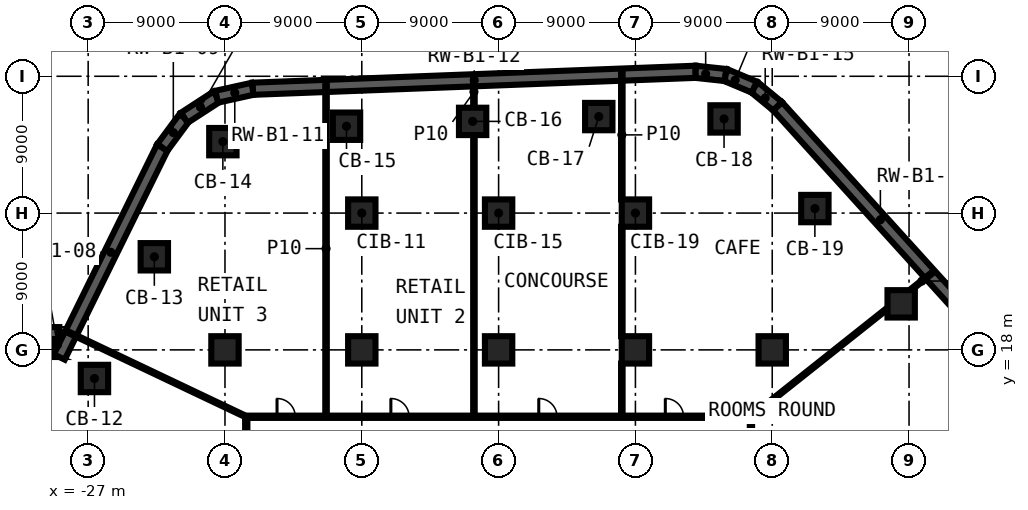
"""IFC4 building model, lengths in metres.
Left out: names, types, materials, properties, quantities, classifications, styles, units other than length and angle.
Written with IfcOpenShell. Run it as: python <this file> out.ifc"""

import sys

from ifc_helpers import new_model, si_unit, direction, frame, frame_2d, origin, origin_2d, place, context, subcontext, project, spatial, polyline, rectangle, outline, extrude, element, fill, save


model = new_model("IFC4")
c1 = context("Model", 3, precision=1e-05, world=origin(), true_north=direction((0.0, 1.0)))
c2 = subcontext(c1, "Body", "Model", "MODEL_VIEW")
j1 = project(units=[si_unit("LENGTHUNIT", "METRE"), si_unit("PLANEANGLEUNIT", "RADIAN")], contexts=[c1])
p1 = place(None, origin())
s1 = spatial("IfcSite", under=j1, at=p1, CompositionType="ELEMENT")
p2 = place(p1, origin())
s2 = spatial("IfcBuilding", under=s1, at=p2, CompositionType="ELEMENT")
p3 = place(p2, frame((0.0, 0.0, -6.0)))
s3 = spatial("IfcBuildingStorey", under=s2, at=p3, CompositionType="ELEMENT", Elevation=-6.0)
for number, where, z_axis, x_axis in (
    (1, (-26.586, 16.118, 0.0), (0.0, 0.0, 1.0), (1.0, 0.0, 0.0)),
    (2, (-22.648, 24.125, 0.0), (0.0, 0.0, 1.0), (1.0, 0.0, 0.0)),
    (3, (-18.139, 31.699, 0.0), (0.0, 0.0, 1.0), (1.0, 0.0, 0.0)),
    (4, (-10.006, 32.714, 0.0), (0.0, 0.0, 1.0), (1.0, 0.0, 0.0)),
    (5, (-1.708, 33.032, 0.0), (0.0, 0.0, 1.0), (1.0, 0.0, 0.0)),
    (6, (6.589, 33.349, 0.0), (0.0, 0.0, 1.0), (1.0, 0.0, 0.0)),
    (7, (14.83, 33.194, 0.0), (0.0, 0.0, 1.0), (1.0, 0.0, 0.0)),
    (8, (20.805, 27.297, 0.0), (0.0, 0.0, 1.0), (1.0, 0.0, 0.0)),
    (9, (26.482, 21.029, 0.0), (0.0, 0.0, 1.0), (1.0, 0.0, 0.0)),
    (10, (-18.0, 18.0, 0.0), (0.0, 0.0, 1.0), (1.0, 0.0, 0.0)),
    (11, (-9.0, 18.0, 0.0), (0.0, 0.0, 1.0), (1.0, 0.0, 0.0)),
    (12, (-9.0, 27.0, 0.0), (0.0, 0.0, 1.0), (1.0, 0.0, 0.0)),
    (13, (0.0, 18.0, 0.0), (0.0, 0.0, 1.0), (1.0, 0.0, 0.0)),
    (14, (0.0, 27.0, 0.0), (0.0, 0.0, 1.0), (1.0, 0.0, 0.0)),
    (15, (9.0, 18.0, 0.0), (0.0, 0.0, 1.0), (1.0, 0.0, 0.0)),
    (16, (9.0, 27.0, 0.0), (0.0, 0.0, 1.0), (1.0, 0.0, 0.0)),
    (17, (18.0, 18.0, 0.0), (0.0, 0.0, 1.0), (1.0, 0.0, 0.0)),
):
    element("IfcColumn", number, at=place(p3, frame(where, z_axis=z_axis, x_axis=x_axis)), inside=s3, PredefinedType="COLUMN", context=c2, shape_type="SweptSolid", body=[
        extrude(rectangle(XDim=1.8, YDim=1.8, at=origin_2d()), origin(), (0.0, 0.0, 1.0), 5.55),
    ])
p4 = place(p3, frame((-59.1, 19.1, 0.0), z_axis=(0.0, 0.0, 1.0), x_axis=(1.0, 0.0, 0.0)))
e18 = element("IfcWall", 18, at=p4, inside=s3, PredefinedType="SHEAR", context=c2, shape_type="SweptSolid", body=[
    extrude(rectangle(XDim=30.2, YDim=0.8, at=frame_2d((15.1, 0.0))), origin(), (0.0, 0.0, 1.0), 5.55),
])
p5 = place(p4, frame((14.3, 0.0, 0.0)))
e19 = element("IfcOpeningElement", 19, at=p5, cuts=e18, PredefinedType="OPENING", context=c2, shape_type="SweptSolid", body=[
    extrude(rectangle(XDim=1.6, YDim=2.4, at=frame_2d((0.8, 1.2))), frame((0.0, 0.41, 0.0), z_axis=(0.0, -1.0, 0.0), x_axis=(1.0, 0.0, 0.0)), (0.0, 0.0, 1.0), 0.82),
])
p6 = place(p3, origin())
e20 = element("IfcWall", 20, at=p6, inside=s3, PredefinedType="SHEAR", context=c2, shape_type="SweptSolid", body=[
    extrude(outline(polyline([(-29.3, 17.532), (-28.9, 17.532), (-29.259, 17.708), (-28.574, 19.1), (-28.9, 19.1), (-28.9, 18.7), (-29.3, 18.7), (-29.3, 17.532)])), origin(), (0.0, 0.0, 1.0), 5.55),
])
p7 = place(p3, frame((-28.9, 17.532, 0.0), z_axis=(0.0, 0.0, 1.0), x_axis=(0.44134064225, 0.897339644448, 0.0)))
e21 = element("IfcWall", 21, at=p7, inside=s3, PredefinedType="SHEAR", context=c2, shape_type="SweptSolid", body=[
    extrude(rectangle(XDim=15.356, YDim=0.8, at=frame_2d((7.678, 0.0))), origin(), (0.0, 0.0, 1.0), 5.55),
])
p8 = place(p3, frame((-22.123, 31.312, 0.0), z_axis=(0.0, 0.0, 1.0), x_axis=(0.594199556296, 0.80431765323, 0.0)))
e22 = element("IfcWall", 22, at=p8, inside=s3, PredefinedType="SHEAR", context=c2, shape_type="SweptSolid", body=[
    extrude(rectangle(XDim=2.438, YDim=0.8, at=frame_2d((1.219, 0.0))), origin(), (0.0, 0.0, 1.0), 5.55),
])
p9 = place(p3, frame((-20.674, 33.272, 0.0), z_axis=(0.0, 0.0, 1.0), x_axis=(0.838722623466, 0.544558868155, 0.0)))
e23 = element("IfcWall", 23, at=p9, inside=s3, PredefinedType="SHEAR", context=c2, shape_type="SweptSolid", body=[
    extrude(rectangle(XDim=2.538, YDim=0.8, at=frame_2d((1.269, 0.0))), origin(), (0.0, 0.0, 1.0), 5.55),
])
p10 = place(p3, frame((-18.545, 34.654, 0.0), z_axis=(0.0, 0.0, 1.0), x_axis=(0.976429182158, 0.215838023136, 0.0)))
e24 = element("IfcWall", 24, at=p10, inside=s3, PredefinedType="SHEAR", context=c2, shape_type="SweptSolid", body=[
    extrude(rectangle(XDim=2.438, YDim=0.8, at=frame_2d((1.219, 0.0))), origin(), (0.0, 0.0, 1.0), 5.55),
])
p11 = place(p3, frame((-16.165, 35.18, 0.0), z_axis=(0.0, 0.0, 1.0), x_axis=(0.999268826627, 0.038233651829, 0.0)))
e25 = element("IfcWall", 25, at=p11, inside=s3, PredefinedType="SHEAR", context=c2, shape_type="SweptSolid", body=[
    extrude(rectangle(XDim=29.143, YDim=0.8, at=frame_2d((14.572, 0.0))), origin(), (0.0, 0.0, 1.0), 5.55),
])
p12 = place(p3, origin())
e26 = element("IfcWall", 26, at=p12, inside=s3, PredefinedType="SHEAR", context=c2, shape_type="SweptSolid", body=[
    extrude(outline(polyline([(14.97, 36.48), (13.0, 36.692), (12.957, 36.295), (12.972, 35.895), (12.943, 35.894), (14.884, 35.685), (14.97, 36.48)])), origin(), (0.0, 0.0, 1.0), 5.55),
])
p13 = place(p3, origin())
e27 = element("IfcWall", 27, at=p13, inside=s3, PredefinedType="SHEAR", context=c2, shape_type="SweptSolid", body=[
    extrude(outline(polyline([(16.983, 35.651), (15.082, 36.451), (14.927, 36.083), (14.884, 35.685), (14.826, 35.691), (16.673, 34.914), (16.983, 35.651)])), origin(), (0.0, 0.0, 1.0), 5.55),
])
p14 = place(p3, origin())
e28 = element("IfcWall", 28, at=p14, inside=s3, PredefinedType="SHEAR", context=c2, shape_type="SweptSolid", body=[
    extrude(outline(polyline([(18.612, 34.331), (17.083, 35.591), (16.828, 35.282), (16.673, 34.914), (16.619, 34.937), (18.08, 33.732), (18.061, 33.754), (18.357, 34.022), (18.612, 34.331)])), origin(), (0.0, 0.0, 1.0), 5.55),
])
p15 = place(p3, frame((18.357, 34.022, 0.0), z_axis=(0.0, 0.0, 1.0), x_axis=(0.671253662178, -0.741227711983, 0.0)))
e29 = element("IfcWall", 29, at=p15, inside=s3, PredefinedType="SHEAR", context=c2, shape_type="SweptSolid", body=[
    extrude(rectangle(XDim=20.132, YDim=0.8, at=frame_2d((10.066, 0.0))), origin(), (0.0, 0.0, 1.0), 5.55),
])
p16 = place(p3, frame((-16.675, 13.6, 0.0), z_axis=(0.0, 0.0, 1.0), x_axis=(1.0, 0.0, 0.0)))
e30 = element("IfcWall", 30, at=p16, inside=s3, PredefinedType="PARTITIONING", context=c2, shape_type="SweptSolid", body=[
    extrude(rectangle(XDim=33.35, YDim=0.15, at=frame_2d((16.675, 0.0))), origin(), (0.0, 0.0, 1.0), 5.55),
])
p17 = place(p16, frame((27.642, 0.0, 0.0)))
e31 = element("IfcOpeningElement", 31, at=p17, cuts=e30, PredefinedType="OPENING", context=c2, shape_type="SweptSolid", body=[
    extrude(rectangle(XDim=1.2, YDim=2.1, at=frame_2d((0.6, 1.05))), frame((0.0, 0.085, 0.0), z_axis=(0.0, -1.0, 0.0), x_axis=(1.0, 0.0, 0.0)), (0.0, 0.0, 1.0), 0.17),
])
p18 = place(p16, frame((19.317, 0.0, 0.0)))
e32 = element("IfcOpeningElement", 32, at=p18, cuts=e30, PredefinedType="OPENING", context=c2, shape_type="SweptSolid", body=[
    extrude(rectangle(XDim=1.2, YDim=2.1, at=frame_2d((0.6, 1.05))), frame((0.0, 0.085, 0.0), z_axis=(0.0, -1.0, 0.0), x_axis=(1.0, 0.0, 0.0)), (0.0, 0.0, 1.0), 0.17),
])
p19 = place(p16, frame((9.587, 0.0, 0.0)))
e33 = element("IfcOpeningElement", 33, at=p19, cuts=e30, PredefinedType="OPENING", context=c2, shape_type="SweptSolid", body=[
    extrude(rectangle(XDim=1.2, YDim=2.1, at=frame_2d((0.6, 1.05))), frame((0.0, 0.085, 0.0), z_axis=(0.0, -1.0, 0.0), x_axis=(1.0, 0.0, 0.0)), (0.0, 0.0, 1.0), 0.17),
])
p20 = place(p16, frame((2.099, 0.0, 0.0)))
e34 = element("IfcOpeningElement", 34, at=p20, cuts=e30, PredefinedType="OPENING", context=c2, shape_type="SweptSolid", body=[
    extrude(rectangle(XDim=1.2, YDim=2.1, at=frame_2d((0.6, 1.05))), frame((0.0, 0.085, 0.0), z_axis=(0.0, -1.0, 0.0), x_axis=(1.0, 0.0, 0.0)), (0.0, 0.0, 1.0), 0.17),
])
p21 = place(p3, frame((16.6, 13.6, 0.0), z_axis=(0.0, 0.0, 1.0), x_axis=(0.783150180029, 0.621832610531, 0.0)))
e35 = element("IfcWall", 35, at=p21, inside=s3, PredefinedType="PARTITIONING", context=c2, shape_type="SweptSolid", body=[
    extrude(rectangle(XDim=11.469, YDim=0.1, at=frame_2d((5.734, 0.0))), origin(), (0.0, 0.0, 1.0), 5.55),
])
p22 = place(p3, frame((27.091, 21.929, 0.0), z_axis=(0.0, 0.0, 1.0), x_axis=(0.783148932994, 0.621834181073, 0.0)))
e36 = element("IfcWall", 36, at=p22, inside=s3, PredefinedType="PARTITIONING", context=c2, shape_type="SweptSolid", body=[
    extrude(rectangle(XDim=1.928, YDim=0.1, at=frame_2d((0.964, 0.0))), origin(), (0.0, 0.0, 1.0), 5.55),
])
p23 = place(p3, frame((16.6, 13.525, 0.0), z_axis=(0.0, 0.0, 1.0), x_axis=(0.0, -1.0, 0.0)))
e37 = element("IfcWall", 37, at=p23, inside=s3, PredefinedType="PARTITIONING", context=c2, shape_type="SweptSolid", body=[
    extrude(rectangle(XDim=27.05, YDim=0.15, at=frame_2d((13.525, 0.0))), origin(), (0.0, 0.0, 1.0), 5.55),
])
p24 = place(p23, frame((18.025, 0.0, 0.0)))
e38 = element("IfcOpeningElement", 38, at=p24, cuts=e37, PredefinedType="OPENING", context=c2, shape_type="SweptSolid", body=[
    extrude(rectangle(XDim=1.2, YDim=2.1, at=frame_2d((0.6, 1.05))), frame((0.0, 0.085, 0.0), z_axis=(0.0, -1.0, 0.0), x_axis=(1.0, 0.0, 0.0)), (0.0, 0.0, 1.0), 0.17),
])
p25 = place(p3, frame((8.106, 13.675, 0.0), z_axis=(0.0, 0.0, 1.0), x_axis=(0.0, 1.0, 0.0)))
e39 = element("IfcWall", 39, at=p25, inside=s3, PredefinedType="PARTITIONING", context=c2, shape_type="SweptSolid", body=[
    extrude(rectangle(XDim=3.425, YDim=0.1, at=frame_2d((1.712, 0.0))), origin(), (0.0, 0.0, 1.0), 5.55),
])
p26 = place(p3, frame((8.106, 18.9, 0.0), z_axis=(0.0, 0.0, 1.0), x_axis=(0.0, 1.0, 0.0)))
e40 = element("IfcWall", 40, at=p26, inside=s3, PredefinedType="PARTITIONING", context=c2, shape_type="SweptSolid", body=[
    extrude(rectangle(XDim=7.2, YDim=0.1, at=frame_2d((3.6, 0.0))), origin(), (0.0, 0.0, 1.0), 5.55),
])
p27 = place(p3, frame((8.106, 27.9, 0.0), z_axis=(0.0, 0.0, 1.0), x_axis=(0.0, 1.0, 0.0)))
e41 = element("IfcWall", 41, at=p27, inside=s3, PredefinedType="PARTITIONING", context=c2, shape_type="SweptSolid", body=[
    extrude(rectangle(XDim=8.489, YDim=0.1, at=frame_2d((4.245, 0.0))), origin(), (0.0, 0.0, 1.0), 5.55),
])
p28 = place(p3, frame((-1.623, 13.675, 0.0), z_axis=(0.0, 0.0, 1.0), x_axis=(0.0, 1.0, 0.0)))
e42 = element("IfcWall", 42, at=p28, inside=s3, PredefinedType="PARTITIONING", context=c2, shape_type="SweptSolid", body=[
    extrude(rectangle(XDim=18.457, YDim=0.1, at=frame_2d((9.229, 0.0))), origin(), (0.0, 0.0, 1.0), 5.55),
])
p29 = place(p3, frame((-1.623, 33.932, 0.0), z_axis=(0.0, 0.0, 1.0), x_axis=(0.0, 1.0, 0.0)))
e43 = element("IfcWall", 43, at=p29, inside=s3, PredefinedType="PARTITIONING", context=c2, shape_type="SweptSolid", body=[
    extrude(rectangle(XDim=2.085, YDim=0.1, at=frame_2d((1.042, 0.0))), origin(), (0.0, 0.0, 1.0), 5.55),
])
p30 = place(p3, frame((-11.352, 13.675, 0.0), z_axis=(0.0, 0.0, 1.0), x_axis=(0.0, 1.0, 0.0)))
e44 = element("IfcWall", 44, at=p30, inside=s3, PredefinedType="PARTITIONING", context=c2, shape_type="SweptSolid", body=[
    extrude(rectangle(XDim=21.97, YDim=0.1, at=frame_2d((10.985, 0.0))), origin(), (0.0, 0.0, 1.0), 5.55),
])
p31 = place(p3, frame((-16.6, -13.525, 0.0), z_axis=(0.0, 0.0, 1.0), x_axis=(0.0, 1.0, 0.0)))
e45 = element("IfcWall", 45, at=p31, inside=s3, PredefinedType="PARTITIONING", context=c2, shape_type="SweptSolid", body=[
    extrude(rectangle(XDim=27.05, YDim=0.15, at=frame_2d((13.525, 0.0))), origin(), (0.0, 0.0, 1.0), 5.55),
])
p32 = place(p31, frame((17.605, 0.0, 0.0)))
e46 = element("IfcOpeningElement", 46, at=p32, cuts=e45, PredefinedType="OPENING", context=c2, shape_type="SweptSolid", body=[
    extrude(rectangle(XDim=1.8, YDim=2.4, at=frame_2d((0.9, 1.2))), frame((0.0, 0.085, 0.0), z_axis=(0.0, -1.0, 0.0), x_axis=(1.0, 0.0, 0.0)), (0.0, 0.0, 1.0), 0.17),
])
p33 = place(p3, frame((-28.392, 19.2, 0.0), z_axis=(0.0, 0.0, 1.0), x_axis=(0.903331859358, -0.428942364273, 0.0)))
e47 = element("IfcWall", 47, at=p33, inside=s3, PredefinedType="PARTITIONING", context=c2, shape_type="SweptSolid", body=[
    extrude(rectangle(XDim=13.054, YDim=0.1, at=frame_2d((6.527, 0.0))), origin(), (0.0, 0.0, 1.0), 5.55),
])
p34 = place(p17, origin())
e48 = element("IfcDoor", 48, at=p34, inside=s3, OperationType="SINGLE_SWING_LEFT", PredefinedType="DOOR", context=c2, shape_type="SweptSolid", body=[
    extrude(rectangle(XDim=1.2, YDim=2.1, at=frame_2d((0.6, 1.05))), frame((0.0, 0.025, 0.0), z_axis=(0.0, -1.0, 0.0), x_axis=(1.0, 0.0, 0.0)), (0.0, 0.0, 1.0), 0.05),
])
fill(e31, e48)
p35 = place(p18, origin())
e49 = element("IfcDoor", 49, at=p35, inside=s3, OperationType="SINGLE_SWING_RIGHT", PredefinedType="DOOR", context=c2, shape_type="SweptSolid", body=[
    extrude(rectangle(XDim=1.2, YDim=2.1, at=frame_2d((0.6, 1.05))), frame((0.0, 0.025, 0.0), z_axis=(0.0, -1.0, 0.0), x_axis=(1.0, 0.0, 0.0)), (0.0, 0.0, 1.0), 0.05),
])
fill(e32, e49)
p36 = place(p19, origin())
e50 = element("IfcDoor", 50, at=p36, inside=s3, OperationType="SINGLE_SWING_LEFT", PredefinedType="DOOR", context=c2, shape_type="SweptSolid", body=[
    extrude(rectangle(XDim=1.2, YDim=2.1, at=frame_2d((0.6, 1.05))), frame((0.0, 0.025, 0.0), z_axis=(0.0, -1.0, 0.0), x_axis=(1.0, 0.0, 0.0)), (0.0, 0.0, 1.0), 0.05),
])
fill(e33, e50)
p37 = place(p20, origin())
e51 = element("IfcDoor", 51, at=p37, inside=s3, OperationType="SINGLE_SWING_RIGHT", PredefinedType="DOOR", context=c2, shape_type="SweptSolid", body=[
    extrude(rectangle(XDim=1.2, YDim=2.1, at=frame_2d((0.6, 1.05))), frame((0.0, 0.025, 0.0), z_axis=(0.0, -1.0, 0.0), x_axis=(1.0, 0.0, 0.0)), (0.0, 0.0, 1.0), 0.05),
])
fill(e34, e51)
save(model, sys.argv[1])
